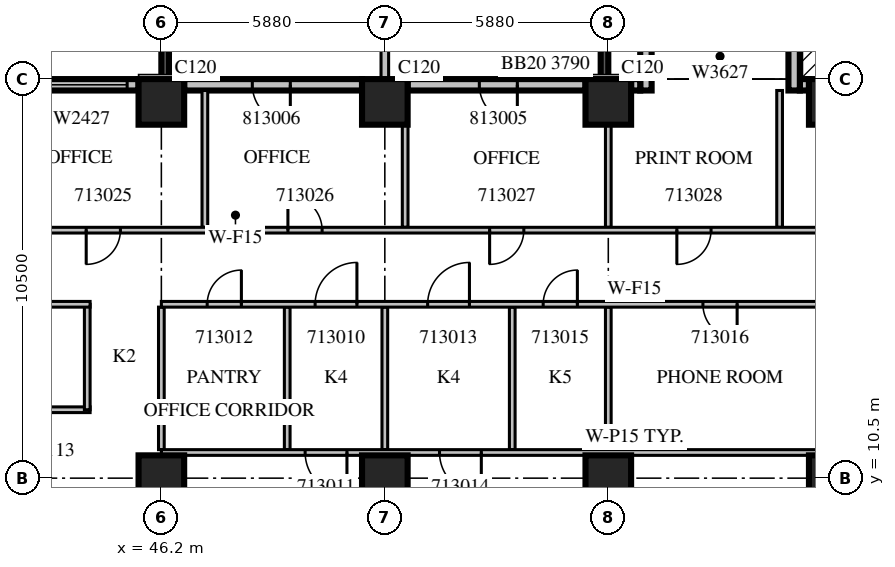
"""IFC4 building model, lengths in metres.
Left out: names, types, materials, properties, quantities, classifications, styles, units other than length and angle.
Written with IfcOpenShell. Run it as: python <this file> out.ifc"""

import sys

from ifc_helpers import new_model, si_unit, direction, frame, frame_2d, origin, origin_2d, place, context, subcontext, project, spatial, rectangle, extrude, source, transform, mapped, element, fill, save


model = new_model("IFC4")
c1 = context("Model", 3, precision=1e-05, world=origin(), true_north=direction((0.0, 1.0)))
c2 = subcontext(c1, "Body", "Model", "MODEL_VIEW")
j1 = project(units=[si_unit("LENGTHUNIT", "METRE"), si_unit("PLANEANGLEUNIT", "RADIAN")], contexts=[c1])
p1 = place(None, origin())
s1 = spatial("IfcSite", under=j1, at=p1, CompositionType="ELEMENT")
p2 = place(p1, origin())
s2 = spatial("IfcBuilding", under=s1, at=p2, CompositionType="ELEMENT")
p3 = place(p2, frame((0.0, 0.0, 65.7)))
s3 = spatial("IfcBuildingStorey", under=s2, at=p3, CompositionType="ELEMENT", Elevation=65.7)
m1 = source(origin(), c2, "Body", "SweptSolid", [
    extrude(rectangle(XDim=1.2, YDim=1.2, at=origin_2d()), origin(), (0.0, 0.0, 1.0), 4.2),
])
for number, where, z_axis, x_axis in (
    (1, (46.2, 10.5, 0.0), (0.0, 0.0, 1.0), (1.0, 0.0, 0.0)),
    (2, (52.08, 10.5, 0.0), (0.0, 0.0, 1.0), (1.0, 0.0, 0.0)),
    (3, (57.96, 10.5, 0.0), (0.0, 0.0, 1.0), (1.0, 0.0, 0.0)),
    (4, (63.84, 10.5, 0.0), (0.0, 0.0, 1.0), (1.0, 0.0, 0.0)),
    (5, (46.2, 20.4, 0.0), (0.0, 0.0, 1.0), (1.0, 0.0, 0.0)),
    (6, (52.08, 20.4, 0.0), (0.0, 0.0, 1.0), (1.0, 0.0, 0.0)),
    (7, (57.96, 20.4, 0.0), (0.0, 0.0, 1.0), (1.0, 0.0, 0.0)),
    (8, (63.84, 20.4, 0.0), (0.0, 0.0, 1.0), (1.0, 0.0, 0.0)),
):
    element("IfcColumn", number, at=place(p3, frame(where, z_axis=z_axis, x_axis=x_axis)), inside=s3, PredefinedType="COLUMN", context=c2, shape_type="MappedRepresentation", body=[
        mapped(m1, transform((0.0, 0.0, 0.0), scale=1.0)),
    ])
m2 = source(origin(), c2, "Body", "SweptSolid", [
    extrude(rectangle(XDim=3.9, YDim=0.2, at=frame_2d((1.95, 0.0))), origin(), (0.0, 0.0, 1.0), 3.79),
])
p4 = place(p3, frame((52.08, 21.0, 0.0), z_axis=(0.0, 0.0, 1.0), x_axis=(0.0, 1.0, 0.0)))
e9 = element("IfcWall", 9, at=p4, inside=s3, PredefinedType="SOLIDWALL", context=c2, shape_type="MappedRepresentation", body=[
    mapped(m2, transform((0.0, 0.0, 0.0), scale=1.0)),
])
m3 = source(origin(), c2, "Body", "SweptSolid", [
    extrude(rectangle(XDim=3.9, YDim=0.2, at=frame_2d((1.95, 0.0))), origin(), (0.0, 0.0, 1.0), 3.79),
])
p5 = place(p3, frame((57.86, 21.0, 0.0), z_axis=(0.0, 0.0, 1.0), x_axis=(0.0, 1.0, 0.0)))
e10 = element("IfcWall", 10, at=p5, inside=s3, PredefinedType="SOLIDWALL", context=c2, shape_type="MappedRepresentation", body=[
    mapped(m3, transform((0.0, 0.0, 0.0), scale=1.0)),
])
m4 = source(origin(), c2, "Body", "SweptSolid", [
    extrude(rectangle(XDim=2.4, YDim=2.7, at=frame_2d((1.2, 1.35))), frame((0.0, 0.11, 0.0), z_axis=(0.0, -1.0, 0.0), x_axis=(1.0, 0.0, 0.0)), (0.0, 0.0, 1.0), 0.22),
])
p6 = place(p5, frame((0.75, 0.0, 0.6)))
e11 = element("IfcOpeningElement", 11, at=p6, cuts=e10, PredefinedType="OPENING", context=c2, shape_type="MappedRepresentation", body=[
    mapped(m4, transform((0.0, 0.0, 0.0), scale=1.0)),
])
p7 = place(p3, frame((46.3, 21.0, 0.0), z_axis=(0.0, 0.0, 1.0), x_axis=(0.0, 1.0, 0.0)))
e12 = element("IfcWall", 12, at=p7, inside=s3, PredefinedType="SOLIDWALL", context=c2, shape_type="MappedRepresentation", body=[
    mapped(m3, transform((0.0, 0.0, 0.0), scale=1.0)),
])
p8 = place(p7, frame((0.75, 0.0, 0.6)))
e13 = element("IfcOpeningElement", 13, at=p8, cuts=e12, PredefinedType="OPENING", context=c2, shape_type="MappedRepresentation", body=[
    mapped(m4, transform((0.0, 0.0, 0.0), scale=1.0)),
])
m5 = source(origin(), c2, "Body", "SweptSolid", [
    extrude(rectangle(XDim=0.24, YDim=0.3, at=frame_2d((0.12, 0.0))), origin(), (0.0, 0.0, 1.0), 3.8),
])
p9 = place(p3, frame((63.24, 20.85, 0.0), z_axis=(0.0, 0.0, 1.0), x_axis=(-1.0, 0.0, 0.0)))
e14 = element("IfcWall", 14, at=p9, inside=s3, PredefinedType="STANDARD", context=c2, shape_type="MappedRepresentation", body=[
    mapped(m5, transform((0.0, 0.0, 0.0), scale=1.0)),
])
m6 = source(origin(), c2, "Body", "SweptSolid", [
    extrude(rectangle(XDim=1.2, YDim=0.3, at=frame_2d((0.6, 0.0))), origin(), (0.0, 0.0, 1.0), 3.8),
])
for number, where, z_axis, x_axis in (
    (15, (62.85, 20.7, 0.0), (0.0, 0.0, 1.0), (0.0, 1.0, 0.0)),
    (16, (58.95, 20.7, 0.0), (0.0, 0.0, 1.0), (0.0, 1.0, 0.0)),
):
    element("IfcWall", number, at=place(p3, frame(where, z_axis=z_axis, x_axis=x_axis)), inside=s3, PredefinedType="STANDARD", context=c2, shape_type="MappedRepresentation", body=[
        mapped(m6, transform((0.0, 0.0, 0.0), scale=1.0)),
    ])
p10 = place(p3, frame((58.8, 20.85, 0.0), z_axis=(0.0, 0.0, 1.0), x_axis=(-1.0, 0.0, 0.0)))
e17 = element("IfcWall", 17, at=p10, inside=s3, PredefinedType="STANDARD", context=c2, shape_type="MappedRepresentation", body=[
    mapped(m5, transform((0.0, 0.0, 0.0), scale=1.0)),
])
m7 = source(origin(), c2, "Body", "SweptSolid", [
    extrude(rectangle(XDim=4.68, YDim=0.3, at=frame_2d((2.34, 0.0))), origin(), (0.0, 0.0, 1.0), 3.8),
])
p11 = place(p3, frame((57.36, 20.85, 0.0), z_axis=(0.0, 0.0, 1.0), x_axis=(-1.0, 0.0, 0.0)))
e18 = element("IfcWall", 18, at=p11, inside=s3, PredefinedType="STANDARD", context=c2, shape_type="MappedRepresentation", body=[
    mapped(m7, transform((0.0, 0.0, 0.0), scale=1.0)),
])
m8 = source(origin(), c2, "Body", "SweptSolid", [
    extrude(rectangle(XDim=1.0, YDim=2.1, at=frame_2d((0.5, 1.05))), frame((0.0, 0.16, 0.0), z_axis=(0.0, -1.0, 0.0), x_axis=(1.0, 0.0, 0.0)), (0.0, 0.0, 1.0), 0.32),
])
p12 = place(p11, frame((1.793, 0.0, 0.0)))
e19 = element("IfcOpeningElement", 19, at=p12, cuts=e18, PredefinedType="OPENING", context=c2, shape_type="MappedRepresentation", body=[
    mapped(m8, transform((0.0, 0.0, 0.0), scale=1.0)),
])
p13 = place(p3, frame((51.48, 20.85, 0.0), z_axis=(0.0, 0.0, 1.0), x_axis=(-1.0, 0.0, 0.0)))
e20 = element("IfcWall", 20, at=p13, inside=s3, PredefinedType="STANDARD", context=c2, shape_type="MappedRepresentation", body=[
    mapped(m7, transform((0.0, 0.0, 0.0), scale=1.0)),
])
p14 = place(p13, frame((1.887, 0.0, 0.0)))
e21 = element("IfcOpeningElement", 21, at=p14, cuts=e20, PredefinedType="OPENING", context=c2, shape_type="MappedRepresentation", body=[
    mapped(m8, transform((0.0, 0.0, 0.0), scale=1.0)),
])
m9 = source(origin(), c2, "Body", "SweptSolid", [
    extrude(rectangle(XDim=7.2, YDim=0.3, at=frame_2d((3.6, 0.0))), origin(), (0.0, 0.0, 1.0), 3.8),
])
p15 = place(p3, frame((45.6, 20.85, 0.0), z_axis=(0.0, 0.0, 1.0), x_axis=(-1.0, 0.0, 0.0)))
e22 = element("IfcWall", 22, at=p15, inside=s3, PredefinedType="STANDARD", context=c2, shape_type="MappedRepresentation", body=[
    mapped(m9, transform((0.0, 0.0, 0.0), scale=1.0)),
])
m10 = source(origin(), c2, "Body", "SweptSolid", [
    extrude(rectangle(XDim=2.4, YDim=2.7, at=frame_2d((1.2, 1.35))), frame((0.0, 0.16, 0.0), z_axis=(0.0, -1.0, 0.0), x_axis=(1.0, 0.0, 0.0)), (0.0, 0.0, 1.0), 0.32),
])
p16 = place(p15, frame((0.3, 0.0, 0.6)))
e23 = element("IfcOpeningElement", 23, at=p16, cuts=e22, PredefinedType="OPENING", context=c2, shape_type="MappedRepresentation", body=[
    mapped(m10, transform((0.0, 0.0, 0.0), scale=1.0)),
])
m11 = source(origin(), c2, "Body", "SweptSolid", [
    extrude(rectangle(XDim=6.45, YDim=0.15, at=frame_2d((3.225, 0.0))), origin(), (0.0, 0.0, 1.0), 3.8),
])
p17 = place(p3, frame((37.875, 12.3, 0.0), z_axis=(0.0, 0.0, 1.0), x_axis=(1.0, 0.0, 0.0)))
e24 = element("IfcWall", 24, at=p17, inside=s3, PredefinedType="PARTITIONING", context=c2, shape_type="MappedRepresentation", body=[
    mapped(m11, transform((0.0, 0.0, 0.0), scale=1.0)),
])
p18 = place(p3, frame((44.25, 12.3, 0.0), z_axis=(0.0, 0.0, 1.0), x_axis=(0.0, 1.0, 0.0)))
e25 = element("IfcWall", 25, at=p18, inside=s3, PredefinedType="PARTITIONING", context=c2, shape_type="SweptSolid", body=[
    extrude(rectangle(XDim=2.775, YDim=0.15, at=frame_2d((1.387, 0.0))), origin(), (0.0, 0.0, 1.0), 3.8),
])
p19 = place(p3, frame((44.325, 15.075, 0.0), z_axis=(0.0, 0.0, 1.0), x_axis=(-1.0, 0.0, 0.0)))
e26 = element("IfcWall", 26, at=p19, inside=s3, PredefinedType="PARTITIONING", context=c2, shape_type="MappedRepresentation", body=[
    mapped(m11, transform((0.0, 0.0, 0.0), scale=1.0)),
])
m12 = source(origin(), c2, "Body", "SweptSolid", [
    extrude(rectangle(XDim=0.9, YDim=2.1, at=frame_2d((0.45, 1.05))), frame((0.0, 0.085, 0.0), z_axis=(0.0, -1.0, 0.0), x_axis=(1.0, 0.0, 0.0)), (0.0, 0.0, 1.0), 0.17),
])
p20 = place(p19, frame((2.812, 0.0, 0.0)))
e27 = element("IfcOpeningElement", 27, at=p20, cuts=e26, PredefinedType="OPENING", context=c2, shape_type="MappedRepresentation", body=[
    mapped(m12, transform((0.0, 0.0, 0.0), scale=1.0)),
])
m13 = source(origin(), c2, "Body", "SweptSolid", [
    extrude(rectangle(XDim=3.75, YDim=0.15, at=frame_2d((1.875, 0.0))), origin(), (0.0, 0.0, 1.0), 3.8),
])
for number, where, z_axis, x_axis in (
    (28, (49.512, 11.25, 0.0), (0.0, 0.0, 1.0), (0.0, 1.0, 0.0)),
    (29, (55.433, 11.25, 0.0), (0.0, 0.0, 1.0), (0.0, 1.0, 0.0)),
    (30, (57.96, 11.25, 0.0), (0.0, 0.0, 1.0), (0.0, 1.0, 0.0)),
    (31, (46.2, 11.25, 0.0), (0.0, 0.0, 1.0), (0.0, 1.0, 0.0)),
    (32, (52.08, 11.25, 0.0), (0.0, 0.0, 1.0), (0.0, 1.0, 0.0)),
):
    element("IfcWall", number, at=place(p3, frame(where, z_axis=z_axis, x_axis=x_axis)), inside=s3, PredefinedType="PARTITIONING", context=c2, shape_type="MappedRepresentation", body=[
        mapped(m13, transform((0.0, 0.0, 0.0), scale=1.0)),
    ])
m14 = source(origin(), c2, "Body", "SweptSolid", [
    extrude(rectangle(XDim=24.9, YDim=0.15, at=frame_2d((12.45, 0.0))), origin(), (0.0, 0.0, 1.0), 3.8),
])
p21 = place(p3, frame((71.1, 11.175, 0.0), z_axis=(0.0, 0.0, 1.0), x_axis=(-1.0, 0.0, 0.0)))
e33 = element("IfcWall", 33, at=p21, inside=s3, PredefinedType="PARTITIONING", context=c2, shape_type="MappedRepresentation", body=[
    mapped(m14, transform((0.0, 0.0, 0.0), scale=1.0)),
])
m15 = source(origin(), c2, "Body", "SweptSolid", [
    extrude(rectangle(XDim=1.1, YDim=2.1, at=frame_2d((0.55, 1.05))), frame((0.0, 0.085, 0.0), z_axis=(0.0, -1.0, 0.0), x_axis=(1.0, 0.0, 0.0)), (0.0, 0.0, 1.0), 0.17),
])
p22 = place(p21, frame((20.017, 0.0, 0.0)))
e34 = element("IfcOpeningElement", 34, at=p22, cuts=e33, PredefinedType="OPENING", context=c2, shape_type="MappedRepresentation", body=[
    mapped(m15, transform((0.0, 0.0, 0.0), scale=1.0)),
])
p23 = place(p21, frame((16.481, 0.0, 0.0)))
e35 = element("IfcOpeningElement", 35, at=p23, cuts=e33, PredefinedType="OPENING", context=c2, shape_type="MappedRepresentation", body=[
    mapped(m15, transform((0.0, 0.0, 0.0), scale=1.0)),
])
p24 = place(p21, frame((4.607, 0.0, 0.0)))
e36 = element("IfcOpeningElement", 36, at=p24, cuts=e33, PredefinedType="OPENING", context=c2, shape_type="MappedRepresentation", body=[
    mapped(m12, transform((0.0, 0.0, 0.0), scale=1.0)),
])
p25 = place(p21, frame((2.243, 0.0, 0.0)))
e37 = element("IfcOpeningElement", 37, at=p25, cuts=e33, PredefinedType="OPENING", context=c2, shape_type="MappedRepresentation", body=[
    mapped(m12, transform((0.0, 0.0, 0.0), scale=1.0)),
])
m16 = source(origin(), c2, "Body", "SweptSolid", [
    extrude(rectangle(XDim=3.6, YDim=0.15, at=frame_2d((1.8, 0.0))), origin(), (0.0, 0.0, 1.0), 3.8),
])
p26 = place(p3, frame((47.345, 20.7, 0.0), z_axis=(0.0, 0.0, 1.0), x_axis=(0.0, -1.0, 0.0)))
e38 = element("IfcWall", 38, at=p26, inside=s3, PredefinedType="PARTITIONING", context=c2, shape_type="MappedRepresentation", body=[
    mapped(m16, transform((0.0, 0.0, 0.0), scale=1.0)),
])
m17 = source(origin(), c2, "Body", "SweptSolid", [
    extrude(rectangle(XDim=2.701, YDim=0.15, at=frame_2d((1.351, 0.0))), origin(), (0.0, 0.0, 1.0), 3.8),
])
p27 = place(p3, frame((52.615, 19.801, 0.0), z_axis=(0.0, 0.0, 1.0), x_axis=(0.0, -1.0, 0.0)))
e39 = element("IfcWall", 39, at=p27, inside=s3, PredefinedType="PARTITIONING", context=c2, shape_type="MappedRepresentation", body=[
    mapped(m17, transform((0.0, 0.0, 0.0), scale=1.0)),
])
p28 = place(p3, frame((62.468, 20.7, 0.0), z_axis=(0.0, 0.0, 1.0), x_axis=(0.0, -1.0, 0.0)))
e40 = element("IfcWall", 40, at=p28, inside=s3, PredefinedType="PARTITIONING", context=c2, shape_type="MappedRepresentation", body=[
    mapped(m16, transform((0.0, 0.0, 0.0), scale=1.0)),
])
p29 = place(p3, frame((57.96, 17.1, 0.0), z_axis=(0.0, 0.0, 1.0), x_axis=(0.0, 1.0, 0.0)))
e41 = element("IfcWall", 41, at=p29, inside=s3, PredefinedType="PARTITIONING", context=c2, shape_type="MappedRepresentation", body=[
    mapped(m17, transform((0.0, 0.0, 0.0), scale=1.0)),
])
p30 = place(p3, frame((71.1, 15.075, 0.0), z_axis=(0.0, 0.0, 1.0), x_axis=(-1.0, 0.0, 0.0)))
e42 = element("IfcWall", 42, at=p30, inside=s3, PredefinedType="PARTITIONING", context=c2, shape_type="MappedRepresentation", body=[
    mapped(m14, transform((0.0, 0.0, 0.0), scale=1.0)),
])
p31 = place(p30, frame((19.754, 0.0, 0.0)))
e43 = element("IfcOpeningElement", 43, at=p31, cuts=e42, PredefinedType="OPENING", context=c2, shape_type="MappedRepresentation", body=[
    mapped(m15, transform((0.0, 0.0, 0.0), scale=1.0)),
])
p32 = place(p30, frame((22.794, 0.0, 0.0)))
e44 = element("IfcOpeningElement", 44, at=p32, cuts=e42, PredefinedType="OPENING", context=c2, shape_type="MappedRepresentation", body=[
    mapped(m12, transform((0.0, 0.0, 0.0), scale=1.0)),
])
p33 = place(p30, frame((16.794, 0.0, 0.0)))
e45 = element("IfcOpeningElement", 45, at=p33, cuts=e42, PredefinedType="OPENING", context=c2, shape_type="MappedRepresentation", body=[
    mapped(m15, transform((0.0, 0.0, 0.0), scale=1.0)),
])
p34 = place(p30, frame((13.954, 0.0, 0.0)))
e46 = element("IfcOpeningElement", 46, at=p34, cuts=e42, PredefinedType="OPENING", context=c2, shape_type="MappedRepresentation", body=[
    mapped(m12, transform((0.0, 0.0, 0.0), scale=1.0)),
])
p35 = place(p30, frame((9.75, 0.0, 0.0)))
e47 = element("IfcOpeningElement", 47, at=p35, cuts=e42, PredefinedType="OPENING", context=c2, shape_type="MappedRepresentation", body=[
    mapped(m12, transform((0.0, 0.0, 0.0), scale=1.0)),
])
m18 = source(origin(), c2, "Body", "SweptSolid", [
    extrude(rectangle(XDim=1.2, YDim=2.1, at=frame_2d((0.6, 1.05))), frame((0.0, 0.085, 0.0), z_axis=(0.0, -1.0, 0.0), x_axis=(1.0, 0.0, 0.0)), (0.0, 0.0, 1.0), 0.17),
])
p36 = place(p30, frame((2.993, 0.0, 0.0)))
e48 = element("IfcOpeningElement", 48, at=p36, cuts=e42, PredefinedType="OPENING", context=c2, shape_type="MappedRepresentation", body=[
    mapped(m18, transform((0.0, 0.0, 0.0), scale=1.0)),
])
m19 = source(origin(), c2, "Body", "SweptSolid", [
    extrude(rectangle(XDim=37.5, YDim=0.15, at=frame_2d((18.75, 0.0))), origin(), (0.0, 0.0, 1.0), 3.8),
])
p37 = place(p3, frame((29.4, 17.025, 0.0), z_axis=(0.0, 0.0, 1.0), x_axis=(1.0, 0.0, 0.0)))
e49 = element("IfcWall", 49, at=p37, inside=s3, PredefinedType="PARTITIONING", context=c2, shape_type="MappedRepresentation", body=[
    mapped(m19, transform((0.0, 0.0, 0.0), scale=1.0)),
])
m20 = source(origin(), c2, "Body", "SweptSolid", [
    extrude(rectangle(XDim=1.0, YDim=2.1, at=frame_2d((0.5, 1.05))), frame((0.0, 0.085, 0.0), z_axis=(0.0, -1.0, 0.0), x_axis=(1.0, 0.0, 0.0)), (0.0, 0.0, 1.0), 0.17),
])
p38 = place(p37, frame((1.357, 0.0, 0.0)))
e50 = element("IfcOpeningElement", 50, at=p38, cuts=e49, PredefinedType="OPENING", context=c2, shape_type="MappedRepresentation", body=[
    mapped(m20, transform((0.0, 0.0, 0.0), scale=1.0)),
])
p39 = place(p37, frame((4.669, 0.0, 0.0)))
e51 = element("IfcOpeningElement", 51, at=p39, cuts=e49, PredefinedType="OPENING", context=c2, shape_type="MappedRepresentation", body=[
    mapped(m20, transform((0.0, 0.0, 0.0), scale=1.0)),
])
p40 = place(p37, frame((7.012, 0.0, 0.0)))
e52 = element("IfcOpeningElement", 52, at=p40, cuts=e49, PredefinedType="OPENING", context=c2, shape_type="MappedRepresentation", body=[
    mapped(m20, transform((0.0, 0.0, 0.0), scale=1.0)),
])
p41 = place(p37, frame((9.158, 0.0, 0.0)))
e53 = element("IfcOpeningElement", 53, at=p41, cuts=e49, PredefinedType="OPENING", context=c2, shape_type="MappedRepresentation", body=[
    mapped(m12, transform((0.0, 0.0, 0.0), scale=1.0)),
])
p42 = place(p37, frame((11.258, 0.0, 0.0)))
e54 = element("IfcOpeningElement", 54, at=p42, cuts=e49, PredefinedType="OPENING", context=c2, shape_type="MappedRepresentation", body=[
    mapped(m12, transform((0.0, 0.0, 0.0), scale=1.0)),
])
p43 = place(p37, frame((14.822, 0.0, 0.0)))
e55 = element("IfcOpeningElement", 55, at=p43, cuts=e49, PredefinedType="OPENING", context=c2, shape_type="MappedRepresentation", body=[
    mapped(m12, transform((0.0, 0.0, 0.0), scale=1.0)),
])
p44 = place(p37, frame((20.13, 0.0, 0.0)))
e56 = element("IfcOpeningElement", 56, at=p44, cuts=e49, PredefinedType="OPENING", context=c2, shape_type="MappedRepresentation", body=[
    mapped(m12, transform((0.0, 0.0, 0.0), scale=1.0)),
])
p45 = place(p37, frame((25.438, 0.0, 0.0)))
e57 = element("IfcOpeningElement", 57, at=p45, cuts=e49, PredefinedType="OPENING", context=c2, shape_type="MappedRepresentation", body=[
    mapped(m12, transform((0.0, 0.0, 0.0), scale=1.0)),
])
p46 = place(p37, frame((30.364, 0.0, 0.0)))
e58 = element("IfcOpeningElement", 58, at=p46, cuts=e49, PredefinedType="OPENING", context=c2, shape_type="MappedRepresentation", body=[
    mapped(m12, transform((0.0, 0.0, 0.0), scale=1.0)),
])
p47 = place(p37, frame((34.871, 0.0, 0.0)))
e59 = element("IfcOpeningElement", 59, at=p47, cuts=e49, PredefinedType="OPENING", context=c2, shape_type="MappedRepresentation", body=[
    mapped(m12, transform((0.0, 0.0, 0.0), scale=1.0)),
])
m21 = source(origin(), c2, "Body", "SweptSolid", [
    extrude(rectangle(XDim=2.4, YDim=2.7, at=frame_2d((1.2, 1.35))), frame((0.0, 0.03, 0.0), z_axis=(0.0, -1.0, 0.0), x_axis=(1.0, 0.0, 0.0)), (0.0, 0.0, 1.0), 0.06),
])
p48 = place(p16, origin())
e60 = element("IfcWindow", 60, at=p48, inside=s3, PartitioningType="SINGLE_PANEL", PredefinedType="WINDOW", context=c2, shape_type="MappedRepresentation", body=[
    mapped(m21, transform((0.0, 0.0, 0.0), scale=1.0)),
])
fill(e23, e60)
m22 = source(origin(), c2, "Body", "SweptSolid", [
    extrude(rectangle(XDim=1.1, YDim=2.1, at=frame_2d((0.55, 1.05))), frame((0.0, 0.025, 0.0), z_axis=(0.0, -1.0, 0.0), x_axis=(1.0, 0.0, 0.0)), (0.0, 0.0, 1.0), 0.05),
])
p49 = place(p31, origin())
e61 = element("IfcDoor", 61, at=p49, inside=s3, OperationType="SINGLE_SWING_RIGHT", PredefinedType="DOOR", context=c2, shape_type="MappedRepresentation", body=[
    mapped(m22, transform((0.0, 0.0, 0.0), scale=1.0)),
])
fill(e43, e61)
p50 = place(p22, origin())
e62 = element("IfcDoor", 62, at=p50, inside=s3, OperationType="SINGLE_SWING_LEFT", PredefinedType="DOOR", context=c2, shape_type="MappedRepresentation", body=[
    mapped(m22, transform((0.0, 0.0, 0.0), scale=1.0)),
])
fill(e34, e62)
m23 = source(origin(), c2, "Body", "SweptSolid", [
    extrude(rectangle(XDim=0.9, YDim=2.1, at=frame_2d((0.45, 1.05))), frame((0.0, 0.025, 0.0), z_axis=(0.0, -1.0, 0.0), x_axis=(1.0, 0.0, 0.0)), (0.0, 0.0, 1.0), 0.05),
])
p51 = place(p32, origin())
e63 = element("IfcDoor", 63, at=p51, inside=s3, OperationType="SINGLE_SWING_RIGHT", PredefinedType="DOOR", context=c2, shape_type="MappedRepresentation", body=[
    mapped(m23, transform((0.0, 0.0, 0.0), scale=1.0)),
])
fill(e44, e63)
p52 = place(p33, origin())
e64 = element("IfcDoor", 64, at=p52, inside=s3, OperationType="SINGLE_SWING_RIGHT", PredefinedType="DOOR", context=c2, shape_type="MappedRepresentation", body=[
    mapped(m22, transform((0.0, 0.0, 0.0), scale=1.0)),
])
fill(e45, e64)
p53 = place(p23, origin())
e65 = element("IfcDoor", 65, at=p53, inside=s3, OperationType="SINGLE_SWING_LEFT", PredefinedType="DOOR", context=c2, shape_type="MappedRepresentation", body=[
    mapped(m22, transform((0.0, 0.0, 0.0), scale=1.0)),
])
fill(e35, e65)
p54 = place(p34, origin())
e66 = element("IfcDoor", 66, at=p54, inside=s3, OperationType="SINGLE_SWING_RIGHT", PredefinedType="DOOR", context=c2, shape_type="MappedRepresentation", body=[
    mapped(m23, transform((0.0, 0.0, 0.0), scale=1.0)),
])
fill(e46, e66)
p55 = place(p35, origin())
e67 = element("IfcDoor", 67, at=p55, inside=s3, OperationType="SINGLE_SWING_LEFT", PredefinedType="DOOR", context=c2, shape_type="MappedRepresentation", body=[
    mapped(m23, transform((0.0, 0.0, 0.0), scale=1.0)),
])
fill(e47, e67)
p56 = place(p43, origin())
e68 = element("IfcDoor", 68, at=p56, inside=s3, OperationType="SINGLE_SWING_RIGHT", PredefinedType="DOOR", context=c2, shape_type="MappedRepresentation", body=[
    mapped(m23, transform((0.0, 0.0, 0.0), scale=1.0)),
])
fill(e55, e68)
p57 = place(p44, origin())
e69 = element("IfcDoor", 69, at=p57, inside=s3, OperationType="SINGLE_SWING_LEFT", PredefinedType="DOOR", context=c2, shape_type="MappedRepresentation", body=[
    mapped(m23, transform((0.0, 0.0, 0.0), scale=1.0)),
])
fill(e56, e69)
p58 = place(p45, origin())
e70 = element("IfcDoor", 70, at=p58, inside=s3, OperationType="SINGLE_SWING_RIGHT", PredefinedType="DOOR", context=c2, shape_type="MappedRepresentation", body=[
    mapped(m23, transform((0.0, 0.0, 0.0), scale=1.0)),
])
fill(e57, e70)
p59 = place(p46, origin())
e71 = element("IfcDoor", 71, at=p59, inside=s3, OperationType="SINGLE_SWING_RIGHT", PredefinedType="DOOR", context=c2, shape_type="MappedRepresentation", body=[
    mapped(m23, transform((0.0, 0.0, 0.0), scale=1.0)),
])
fill(e58, e71)
m24 = source(origin(), c2, "Body", "SweptSolid", [
    extrude(rectangle(XDim=1.0, YDim=2.1, at=frame_2d((0.5, 1.05))), frame((0.0, 0.025, 0.0), z_axis=(0.0, -1.0, 0.0), x_axis=(1.0, 0.0, 0.0)), (0.0, 0.0, 1.0), 0.05),
])
p60 = place(p12, origin())
e72 = element("IfcDoor", 72, at=p60, inside=s3, OperationType="SINGLE_SWING_LEFT", PredefinedType="DOOR", context=c2, shape_type="MappedRepresentation", body=[
    mapped(m24, transform((0.0, 0.0, 0.0), scale=1.0)),
])
fill(e19, e72)
p61 = place(p14, origin())
e73 = element("IfcDoor", 73, at=p61, inside=s3, OperationType="SINGLE_SWING_LEFT", PredefinedType="DOOR", context=c2, shape_type="MappedRepresentation", body=[
    mapped(m24, transform((0.0, 0.0, 0.0), scale=1.0)),
])
fill(e21, e73)
save(model, sys.argv[1])
